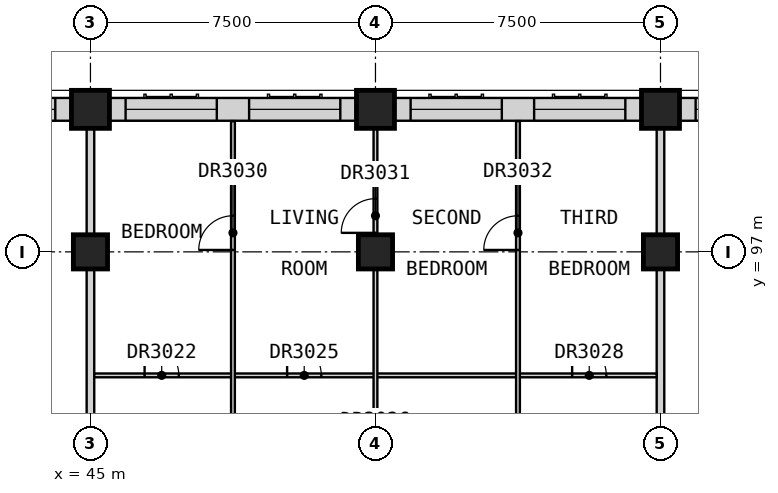
"""IFC4 building model, lengths in metres.
Left out: names, types, materials, properties, quantities, classifications, styles, units other than length and angle.
Written with IfcOpenShell. Run it as: python <this file> out.ifc"""

import sys

from ifc_helpers import new_model, si_unit, direction, frame, frame_2d, origin, origin_2d, place, context, subcontext, project, spatial, rectangle, extrude, element, fill, save


model = new_model("IFC4")
c1 = context("Model", 3, precision=1e-05, world=origin(), true_north=direction((0.0, 1.0)))
c2 = subcontext(c1, "Body", "Model", "MODEL_VIEW")
j1 = project(units=[si_unit("LENGTHUNIT", "METRE"), si_unit("PLANEANGLEUNIT", "RADIAN")], contexts=[c1])
p1 = place(None, origin())
s1 = spatial("IfcSite", under=j1, at=p1, CompositionType="ELEMENT")
p2 = place(p1, origin())
s2 = spatial("IfcBuilding", under=s1, at=p2, CompositionType="ELEMENT")
p3 = place(p2, frame((0.0, 0.0, 186.2)))
s3 = spatial("IfcBuildingStorey", under=s2, at=p3, CompositionType="ELEMENT", Elevation=186.2)
for number, where, z_axis, x_axis in (
    (1, (45.0, 100.75, 0.0), (0.0, 0.0, 1.0), (1.0, 0.0, 0.0)),
    (2, (52.5, 100.75, 0.0), (0.0, 0.0, 1.0), (1.0, 0.0, 0.0)),
    (3, (60.0, 100.75, 0.0), (0.0, 0.0, 1.0), (1.0, 0.0, 0.0)),
):
    element("IfcColumn", number, at=place(p3, frame(where, z_axis=z_axis, x_axis=x_axis)), inside=s3, PredefinedType="COLUMN", context=c2, shape_type="SweptSolid", body=[
        extrude(rectangle(XDim=1.0, YDim=1.0, at=origin_2d()), origin(), (0.0, 0.0, 1.0), 3.5),
    ])
for number, where, z_axis, x_axis in (
    (4, (45.0, 97.0, 0.0), (0.0, 0.0, 1.0), (1.0, 0.0, 0.0)),
    (5, (52.5, 97.0, 0.0), (0.0, 0.0, 1.0), (1.0, 0.0, 0.0)),
    (6, (60.0, 97.0, 0.0), (0.0, 0.0, 1.0), (1.0, 0.0, 0.0)),
):
    element("IfcColumn", number, at=place(p3, frame(where, z_axis=z_axis, x_axis=x_axis)), inside=s3, PredefinedType="COLUMN", context=c2, shape_type="SweptSolid", body=[
        extrude(rectangle(XDim=0.9, YDim=0.9, at=origin_2d()), origin(), (0.0, 0.0, 1.0), 3.5),
    ])
p4 = place(p3, frame((67.0, 100.75, 0.0), z_axis=(0.0, 0.0, 1.0), x_axis=(-1.0, 0.0, 0.0)))
e7 = element("IfcWall", 7, at=p4, inside=s3, PredefinedType="SOLIDWALL", context=c2, shape_type="SweptSolid", body=[
    extrude(rectangle(XDim=6.5, YDim=0.6, at=frame_2d((3.25, 0.0))), origin(), (0.0, 0.0, 1.0), 2.75),
])
p5 = place(p4, frame((3.675, 0.0, 0.8)))
e8 = element("IfcOpeningElement", 8, at=p5, cuts=e7, PredefinedType="OPENING", context=c2, shape_type="SweptSolid", body=[
    extrude(rectangle(XDim=2.4, YDim=1.8, at=frame_2d((1.2, 0.9))), frame((0.0, 0.31, 0.0), z_axis=(0.0, -1.0, 0.0), x_axis=(1.0, 0.0, 0.0)), (0.0, 0.0, 1.0), 0.62),
])
p6 = place(p4, frame((0.425, 0.0, 0.8)))
e9 = element("IfcOpeningElement", 9, at=p6, cuts=e7, PredefinedType="OPENING", context=c2, shape_type="SweptSolid", body=[
    extrude(rectangle(XDim=2.4, YDim=1.8, at=frame_2d((1.2, 0.9))), frame((0.0, 0.31, 0.0), z_axis=(0.0, -1.0, 0.0), x_axis=(1.0, 0.0, 0.0)), (0.0, 0.0, 1.0), 0.62),
])
p7 = place(p3, frame((59.5, 100.75, 0.0), z_axis=(0.0, 0.0, 1.0), x_axis=(-1.0, 0.0, 0.0)))
e10 = element("IfcWall", 10, at=p7, inside=s3, PredefinedType="SOLIDWALL", context=c2, shape_type="SweptSolid", body=[
    extrude(rectangle(XDim=6.5, YDim=0.6, at=frame_2d((3.25, 0.0))), origin(), (0.0, 0.0, 1.0), 2.75),
])
p8 = place(p7, frame((3.675, 0.0, 0.8)))
e11 = element("IfcOpeningElement", 11, at=p8, cuts=e10, PredefinedType="OPENING", context=c2, shape_type="SweptSolid", body=[
    extrude(rectangle(XDim=2.4, YDim=1.8, at=frame_2d((1.2, 0.9))), frame((0.0, 0.31, 0.0), z_axis=(0.0, -1.0, 0.0), x_axis=(1.0, 0.0, 0.0)), (0.0, 0.0, 1.0), 0.62),
])
p9 = place(p7, frame((0.425, 0.0, 0.8)))
e12 = element("IfcOpeningElement", 12, at=p9, cuts=e10, PredefinedType="OPENING", context=c2, shape_type="SweptSolid", body=[
    extrude(rectangle(XDim=2.4, YDim=1.8, at=frame_2d((1.2, 0.9))), frame((0.0, 0.31, 0.0), z_axis=(0.0, -1.0, 0.0), x_axis=(1.0, 0.0, 0.0)), (0.0, 0.0, 1.0), 0.62),
])
p10 = place(p3, frame((52.0, 100.75, 0.0), z_axis=(0.0, 0.0, 1.0), x_axis=(-1.0, 0.0, 0.0)))
e13 = element("IfcWall", 13, at=p10, inside=s3, PredefinedType="SOLIDWALL", context=c2, shape_type="SweptSolid", body=[
    extrude(rectangle(XDim=6.5, YDim=0.6, at=frame_2d((3.25, 0.0))), origin(), (0.0, 0.0, 1.0), 2.75),
])
p11 = place(p10, frame((3.675, 0.0, 0.8)))
e14 = element("IfcOpeningElement", 14, at=p11, cuts=e13, PredefinedType="OPENING", context=c2, shape_type="SweptSolid", body=[
    extrude(rectangle(XDim=2.4, YDim=1.8, at=frame_2d((1.2, 0.9))), frame((0.0, 0.31, 0.0), z_axis=(0.0, -1.0, 0.0), x_axis=(1.0, 0.0, 0.0)), (0.0, 0.0, 1.0), 0.62),
])
p12 = place(p10, frame((0.425, 0.0, 0.8)))
e15 = element("IfcOpeningElement", 15, at=p12, cuts=e13, PredefinedType="OPENING", context=c2, shape_type="SweptSolid", body=[
    extrude(rectangle(XDim=2.4, YDim=1.8, at=frame_2d((1.2, 0.9))), frame((0.0, 0.31, 0.0), z_axis=(0.0, -1.0, 0.0), x_axis=(1.0, 0.0, 0.0)), (0.0, 0.0, 1.0), 0.62),
])
p13 = place(p3, frame((44.5, 100.75, 0.0), z_axis=(0.0, 0.0, 1.0), x_axis=(-1.0, 0.0, 0.0)))
e16 = element("IfcWall", 16, at=p13, inside=s3, PredefinedType="SOLIDWALL", context=c2, shape_type="SweptSolid", body=[
    extrude(rectangle(XDim=6.5, YDim=0.6, at=frame_2d((3.25, 0.0))), origin(), (0.0, 0.0, 1.0), 2.75),
])
p14 = place(p13, frame((3.675, 0.0, 0.8)))
e17 = element("IfcOpeningElement", 17, at=p14, cuts=e16, PredefinedType="OPENING", context=c2, shape_type="SweptSolid", body=[
    extrude(rectangle(XDim=2.4, YDim=1.8, at=frame_2d((1.2, 0.9))), frame((0.0, 0.31, 0.0), z_axis=(0.0, -1.0, 0.0), x_axis=(1.0, 0.0, 0.0)), (0.0, 0.0, 1.0), 0.62),
])
p15 = place(p13, frame((0.425, 0.0, 0.8)))
e18 = element("IfcOpeningElement", 18, at=p15, cuts=e16, PredefinedType="OPENING", context=c2, shape_type="SweptSolid", body=[
    extrude(rectangle(XDim=2.4, YDim=1.8, at=frame_2d((1.2, 0.9))), frame((0.0, 0.31, 0.0), z_axis=(0.0, -1.0, 0.0), x_axis=(1.0, 0.0, 0.0)), (0.0, 0.0, 1.0), 0.62),
])
for number, where, z_axis, x_axis in (
    (19, (45.0, 84.675, 0.0), (0.0, 0.0, 1.0), (0.0, 1.0, 0.0)),
    (20, (60.0, 84.675, 0.0), (0.0, 0.0, 1.0), (0.0, 1.0, 0.0)),
):
    element("IfcWall", number, at=place(p3, frame(where, z_axis=z_axis, x_axis=x_axis)), inside=s3, PredefinedType="PARTITIONING", context=c2, shape_type="SweptSolid", body=[
        extrude(rectangle(XDim=16.575, YDim=0.2, at=frame_2d((8.288, 0.0))), origin(), (0.0, 0.0, 1.0), 3.25),
    ])
p16 = place(p3, frame((45.1, 93.75, 0.0), z_axis=(0.0, 0.0, 1.0), x_axis=(1.0, 0.0, 0.0)))
e21 = element("IfcWall", 21, at=p16, inside=s3, PredefinedType="PARTITIONING", context=c2, shape_type="SweptSolid", body=[
    extrude(rectangle(XDim=14.8, YDim=0.1, at=frame_2d((7.4, 0.0))), origin(), (0.0, 0.0, 1.0), 3.25),
])
p17 = place(p16, frame((1.325, 0.0, 0.0)))
e22 = element("IfcOpeningElement", 22, at=p17, cuts=e21, PredefinedType="OPENING", context=c2, shape_type="SweptSolid", body=[
    extrude(rectangle(XDim=0.9, YDim=2.1, at=frame_2d((0.45, 1.05))), frame((0.0, 0.06, 0.0), z_axis=(0.0, -1.0, 0.0), x_axis=(1.0, 0.0, 0.0)), (0.0, 0.0, 1.0), 0.12),
])
p18 = place(p16, frame((5.075, 0.0, 0.0)))
e23 = element("IfcOpeningElement", 23, at=p18, cuts=e21, PredefinedType="OPENING", context=c2, shape_type="SweptSolid", body=[
    extrude(rectangle(XDim=0.9, YDim=2.1, at=frame_2d((0.45, 1.05))), frame((0.0, 0.06, 0.0), z_axis=(0.0, -1.0, 0.0), x_axis=(1.0, 0.0, 0.0)), (0.0, 0.0, 1.0), 0.12),
])
p19 = place(p16, frame((12.575, 0.0, 0.0)))
e24 = element("IfcOpeningElement", 24, at=p19, cuts=e21, PredefinedType="OPENING", context=c2, shape_type="SweptSolid", body=[
    extrude(rectangle(XDim=0.9, YDim=2.1, at=frame_2d((0.45, 1.05))), frame((0.0, 0.06, 0.0), z_axis=(0.0, -1.0, 0.0), x_axis=(1.0, 0.0, 0.0)), (0.0, 0.0, 1.0), 0.12),
])
p20 = place(p3, frame((48.75, 89.238, 0.0), z_axis=(0.0, 0.0, 1.0), x_axis=(0.0, 1.0, 0.0)))
e25 = element("IfcWall", 25, at=p20, inside=s3, PredefinedType="PARTITIONING", context=c2, shape_type="SweptSolid", body=[
    extrude(rectangle(XDim=11.202, YDim=0.1, at=frame_2d((5.601, 0.0))), origin(), (0.0, 0.0, 1.0), 3.25),
])
p21 = place(p20, frame((7.812, 0.0, 0.0)))
e26 = element("IfcOpeningElement", 26, at=p21, cuts=e25, PredefinedType="OPENING", context=c2, shape_type="SweptSolid", body=[
    extrude(rectangle(XDim=0.9, YDim=2.1, at=frame_2d((0.45, 1.05))), frame((0.0, 0.06, 0.0), z_axis=(0.0, -1.0, 0.0), x_axis=(1.0, 0.0, 0.0)), (0.0, 0.0, 1.0), 0.12),
])
p22 = place(p3, frame((52.5, 89.238, 0.0), z_axis=(0.0, 0.0, 1.0), x_axis=(0.0, 1.0, 0.0)))
e27 = element("IfcWall", 27, at=p22, inside=s3, PredefinedType="PARTITIONING", context=c2, shape_type="SweptSolid", body=[
    extrude(rectangle(XDim=12.012, YDim=0.1, at=frame_2d((6.006, 0.0))), origin(), (0.0, 0.0, 1.0), 3.25),
])
p23 = place(p22, frame((1.775, 0.0, 0.0)))
e28 = element("IfcOpeningElement", 28, at=p23, cuts=e27, PredefinedType="OPENING", context=c2, shape_type="SweptSolid", body=[
    extrude(rectangle(XDim=0.9, YDim=2.1, at=frame_2d((0.45, 1.05))), frame((0.0, 0.06, 0.0), z_axis=(0.0, -1.0, 0.0), x_axis=(1.0, 0.0, 0.0)), (0.0, 0.0, 1.0), 0.12),
])
p24 = place(p22, frame((8.262, 0.0, 0.0)))
e29 = element("IfcOpeningElement", 29, at=p24, cuts=e27, PredefinedType="OPENING", context=c2, shape_type="SweptSolid", body=[
    extrude(rectangle(XDim=0.9, YDim=2.1, at=frame_2d((0.45, 1.05))), frame((0.0, 0.06, 0.0), z_axis=(0.0, -1.0, 0.0), x_axis=(1.0, 0.0, 0.0)), (0.0, 0.0, 1.0), 0.12),
])
p25 = place(p3, frame((56.25, 89.238, 0.0), z_axis=(0.0, 0.0, 1.0), x_axis=(0.0, 1.0, 0.0)))
e30 = element("IfcWall", 30, at=p25, inside=s3, PredefinedType="PARTITIONING", context=c2, shape_type="SweptSolid", body=[
    extrude(rectangle(XDim=11.202, YDim=0.1, at=frame_2d((5.601, 0.0))), origin(), (0.0, 0.0, 1.0), 3.25),
])
p26 = place(p25, frame((7.812, 0.0, 0.0)))
e31 = element("IfcOpeningElement", 31, at=p26, cuts=e30, PredefinedType="OPENING", context=c2, shape_type="SweptSolid", body=[
    extrude(rectangle(XDim=0.9, YDim=2.1, at=frame_2d((0.45, 1.05))), frame((0.0, 0.06, 0.0), z_axis=(0.0, -1.0, 0.0), x_axis=(1.0, 0.0, 0.0)), (0.0, 0.0, 1.0), 0.12),
])
p27 = place(p5, origin())
e32 = element("IfcWindow", 32, at=p27, inside=s3, PartitioningType="SINGLE_PANEL", PredefinedType="WINDOW", context=c2, shape_type="SweptSolid", body=[
    extrude(rectangle(XDim=2.4, YDim=1.8, at=frame_2d((1.2, 0.9))), frame((0.0, -0.07, 0.0), z_axis=(0.0, -1.0, 0.0), x_axis=(1.0, 0.0, 0.0)), (0.0, 0.0, 1.0), 0.06),
])
fill(e8, e32)
p28 = place(p8, origin())
e33 = element("IfcWindow", 33, at=p28, inside=s3, PartitioningType="SINGLE_PANEL", PredefinedType="WINDOW", context=c2, shape_type="SweptSolid", body=[
    extrude(rectangle(XDim=2.4, YDim=1.8, at=frame_2d((1.2, 0.9))), frame((0.0, -0.07, 0.0), z_axis=(0.0, -1.0, 0.0), x_axis=(1.0, 0.0, 0.0)), (0.0, 0.0, 1.0), 0.06),
])
fill(e11, e33)
p29 = place(p9, origin())
e34 = element("IfcWindow", 34, at=p29, inside=s3, PartitioningType="SINGLE_PANEL", PredefinedType="WINDOW", context=c2, shape_type="SweptSolid", body=[
    extrude(rectangle(XDim=2.4, YDim=1.8, at=frame_2d((1.2, 0.9))), frame((0.0, -0.07, 0.0), z_axis=(0.0, -1.0, 0.0), x_axis=(1.0, 0.0, 0.0)), (0.0, 0.0, 1.0), 0.06),
])
fill(e12, e34)
p30 = place(p11, origin())
e35 = element("IfcWindow", 35, at=p30, inside=s3, PartitioningType="SINGLE_PANEL", PredefinedType="WINDOW", context=c2, shape_type="SweptSolid", body=[
    extrude(rectangle(XDim=2.4, YDim=1.8, at=frame_2d((1.2, 0.9))), frame((0.0, -0.07, 0.0), z_axis=(0.0, -1.0, 0.0), x_axis=(1.0, 0.0, 0.0)), (0.0, 0.0, 1.0), 0.06),
])
fill(e14, e35)
p31 = place(p12, origin())
e36 = element("IfcWindow", 36, at=p31, inside=s3, PartitioningType="SINGLE_PANEL", PredefinedType="WINDOW", context=c2, shape_type="SweptSolid", body=[
    extrude(rectangle(XDim=2.4, YDim=1.8, at=frame_2d((1.2, 0.9))), frame((0.0, -0.07, 0.0), z_axis=(0.0, -1.0, 0.0), x_axis=(1.0, 0.0, 0.0)), (0.0, 0.0, 1.0), 0.06),
])
fill(e15, e36)
p32 = place(p15, origin())
e37 = element("IfcWindow", 37, at=p32, inside=s3, PartitioningType="SINGLE_PANEL", PredefinedType="WINDOW", context=c2, shape_type="SweptSolid", body=[
    extrude(rectangle(XDim=2.4, YDim=1.8, at=frame_2d((1.2, 0.9))), frame((0.0, -0.07, 0.0), z_axis=(0.0, -1.0, 0.0), x_axis=(1.0, 0.0, 0.0)), (0.0, 0.0, 1.0), 0.06),
])
fill(e18, e37)
p33 = place(p17, origin())
e38 = element("IfcDoor", 38, at=p33, inside=s3, OperationType="SINGLE_SWING_RIGHT", PredefinedType="DOOR", context=c2, shape_type="SweptSolid", body=[
    extrude(rectangle(XDim=0.9, YDim=2.1, at=frame_2d((0.45, 1.05))), frame((0.0, 0.025, 0.0), z_axis=(0.0, -1.0, 0.0), x_axis=(1.0, 0.0, 0.0)), (0.0, 0.0, 1.0), 0.05),
])
fill(e22, e38)
p34 = place(p18, origin())
e39 = element("IfcDoor", 39, at=p34, inside=s3, OperationType="SINGLE_SWING_RIGHT", PredefinedType="DOOR", context=c2, shape_type="SweptSolid", body=[
    extrude(rectangle(XDim=0.9, YDim=2.1, at=frame_2d((0.45, 1.05))), frame((0.0, 0.025, 0.0), z_axis=(0.0, -1.0, 0.0), x_axis=(1.0, 0.0, 0.0)), (0.0, 0.0, 1.0), 0.05),
])
fill(e23, e39)
p35 = place(p19, origin())
e40 = element("IfcDoor", 40, at=p35, inside=s3, OperationType="SINGLE_SWING_RIGHT", PredefinedType="DOOR", context=c2, shape_type="SweptSolid", body=[
    extrude(rectangle(XDim=0.9, YDim=2.1, at=frame_2d((0.45, 1.05))), frame((0.0, 0.025, 0.0), z_axis=(0.0, -1.0, 0.0), x_axis=(1.0, 0.0, 0.0)), (0.0, 0.0, 1.0), 0.05),
])
fill(e24, e40)
p36 = place(p21, origin())
e41 = element("IfcDoor", 41, at=p36, inside=s3, OperationType="SINGLE_SWING_LEFT", PredefinedType="DOOR", context=c2, shape_type="SweptSolid", body=[
    extrude(rectangle(XDim=0.9, YDim=2.1, at=frame_2d((0.45, 1.05))), frame((0.0, 0.025, 0.0), z_axis=(0.0, -1.0, 0.0), x_axis=(1.0, 0.0, 0.0)), (0.0, 0.0, 1.0), 0.05),
])
fill(e26, e41)
p37 = place(p24, origin())
e42 = element("IfcDoor", 42, at=p37, inside=s3, OperationType="SINGLE_SWING_RIGHT", PredefinedType="DOOR", context=c2, shape_type="SweptSolid", body=[
    extrude(rectangle(XDim=0.9, YDim=2.1, at=frame_2d((0.45, 1.05))), frame((0.0, 0.025, 0.0), z_axis=(0.0, -1.0, 0.0), x_axis=(1.0, 0.0, 0.0)), (0.0, 0.0, 1.0), 0.05),
])
fill(e29, e42)
p38 = place(p26, origin())
e43 = element("IfcDoor", 43, at=p38, inside=s3, OperationType="SINGLE_SWING_LEFT", PredefinedType="DOOR", context=c2, shape_type="SweptSolid", body=[
    extrude(rectangle(XDim=0.9, YDim=2.1, at=frame_2d((0.45, 1.05))), frame((0.0, 0.025, 0.0), z_axis=(0.0, -1.0, 0.0), x_axis=(1.0, 0.0, 0.0)), (0.0, 0.0, 1.0), 0.05),
])
fill(e31, e43)
save(model, sys.argv[1])
